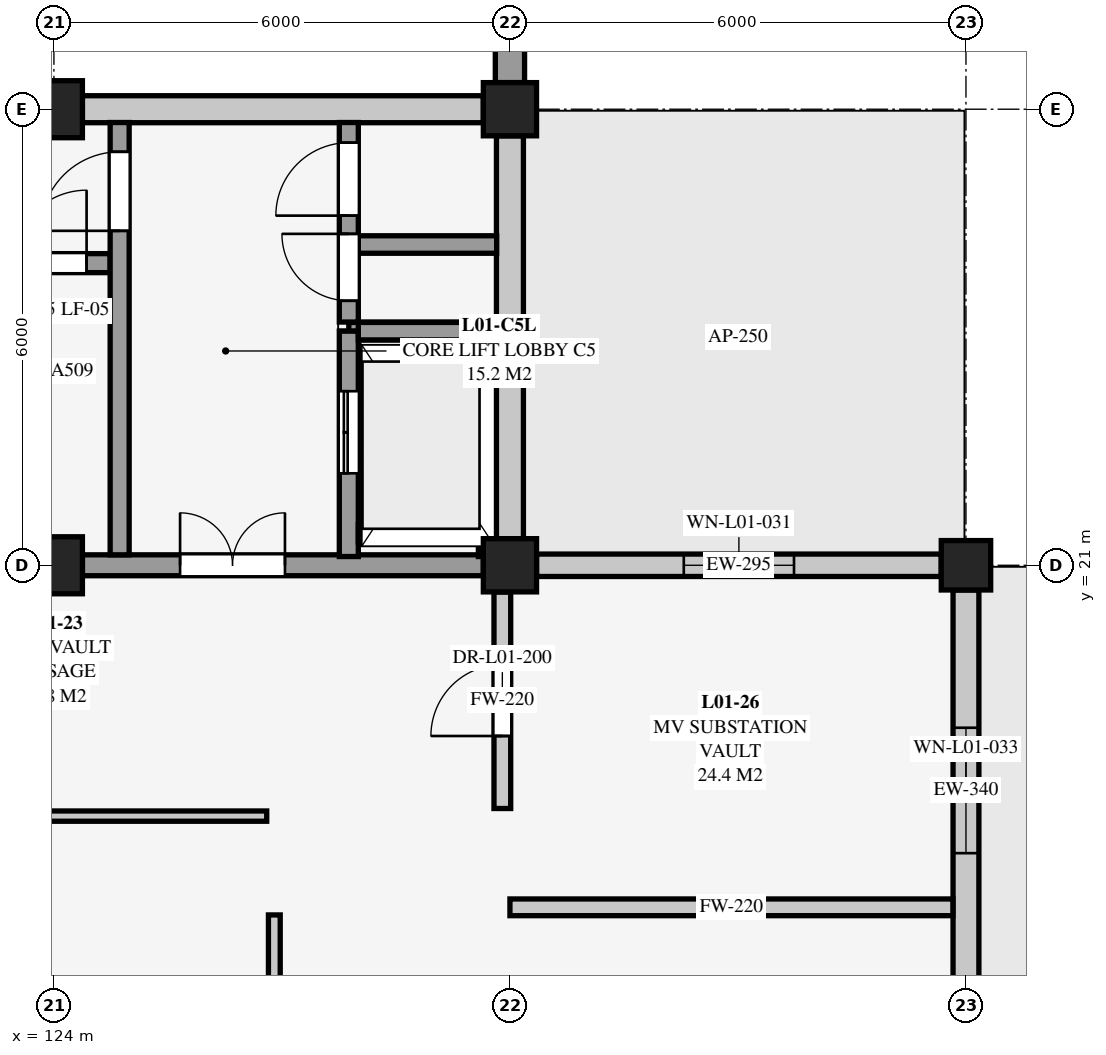
"""IFC4 building model, lengths in metres.
Left out: names, types, materials, properties, quantities, classifications, styles, units other than length and angle.
Written with IfcOpenShell. Run it as: python <this file> out.ifc"""

import sys

from ifc_helpers import new_model, si_unit, direction, frame, frame_2d, origin, origin_2d, place, context, subcontext, project, spatial, rectangle, extrude, element, fill, save


model = new_model("IFC4")
c1 = context("Model", 3, precision=1e-05, world=origin(), true_north=direction((0.0, 1.0)))
c2 = subcontext(c1, "Body", "Model", "MODEL_VIEW")
j1 = project(units=[si_unit("LENGTHUNIT", "METRE"), si_unit("PLANEANGLEUNIT", "RADIAN")], contexts=[c1])
p1 = place(None, origin())
s1 = spatial("IfcSite", under=j1, at=p1, CompositionType="ELEMENT")
p2 = place(p1, origin())
s2 = spatial("IfcBuilding", under=s1, at=p2, CompositionType="ELEMENT")
p3 = place(p2, origin())
s3 = spatial("IfcBuildingStorey", under=s2, at=p3, CompositionType="ELEMENT", Elevation=0.0)
for number, where, z_axis, x_axis in (
    (1, (124.0, 21.0, 0.0), (0.0, 0.0, 1.0), (1.0, 0.0, 0.0)),
    (2, (124.0, 27.0, 0.0), (0.0, 0.0, 1.0), (1.0, 0.0, 0.0)),
):
    element("IfcColumn", number, at=place(p3, frame(where, z_axis=z_axis, x_axis=x_axis)), inside=s3, PredefinedType="COLUMN", context=c2, shape_type="SweptSolid", body=[
        extrude(rectangle(XDim=0.75, YDim=0.75, at=origin_2d()), origin(), (0.0, 0.0, 1.0), 4.5),
    ])
for number, where, z_axis, x_axis in (
    (3, (130.0, 21.0, 0.0), (0.0, 0.0, 1.0), (1.0, 0.0, 0.0)),
    (4, (130.0, 27.0, 0.0), (0.0, 0.0, 1.0), (1.0, 0.0, 0.0)),
):
    element("IfcColumn", number, at=place(p3, frame(where, z_axis=z_axis, x_axis=x_axis)), inside=s3, PredefinedType="COLUMN", context=c2, shape_type="SweptSolid", body=[
        extrude(rectangle(XDim=0.7, YDim=0.7, at=origin_2d()), origin(), (0.0, 0.0, 1.0), 4.5),
    ])
p4 = place(p3, frame((136.0, 21.0, 0.0), z_axis=(0.0, 0.0, 1.0), x_axis=(1.0, 0.0, 0.0)))
e5 = element("IfcColumn", 5, at=p4, inside=s3, PredefinedType="COLUMN", context=c2, shape_type="SweptSolid", body=[
    extrude(rectangle(XDim=0.65, YDim=0.65, at=origin_2d()), origin(), (0.0, 0.0, 1.0), 4.5),
])
p5 = place(p3, frame((130.0, 27.35, 0.0), z_axis=(0.0, 0.0, 1.0), x_axis=(0.0, 1.0, 0.0)))
e6 = element("IfcWall", 6, at=p5, inside=s3, PredefinedType="USERDEFINED", context=c2, shape_type="SweptSolid", body=[
    extrude(rectangle(XDim=5.3, YDim=0.385, at=frame_2d((2.65, 0.0))), origin(), (0.0, 0.0, 1.0), 4.5),
])
p6 = place(p3, frame((130.35, 21.0, 0.0), z_axis=(0.0, 0.0, 1.0), x_axis=(1.0, 0.0, 0.0)))
e7 = element("IfcWall", 7, at=p6, inside=s3, PredefinedType="SOLIDWALL", context=c2, shape_type="SweptSolid", body=[
    extrude(rectangle(XDim=5.325, YDim=0.295, at=frame_2d((2.663, 0.0))), origin(), (0.0, 0.0, 1.0), 3.809),
])
p7 = place(p6, frame((1.938, 0.0, 0.75)))
e8 = element("IfcOpeningElement", 8, at=p7, cuts=e7, PredefinedType="OPENING", context=c2, shape_type="SweptSolid", body=[
    extrude(rectangle(XDim=1.45, YDim=2.25, at=frame_2d((0.725, 1.125))), frame((0.0, 0.157, 0.0), z_axis=(0.0, -1.0, 0.0), x_axis=(1.0, 0.0, 0.0)), (0.0, 0.0, 1.0), 0.315),
])
p8 = place(p3, frame((136.0, 20.675, 0.0), z_axis=(0.0, 0.0, 1.0), x_axis=(0.0, -1.0, 0.0)))
e9 = element("IfcWall", 9, at=p8, inside=s3, PredefinedType="SOLIDWALL", context=c2, shape_type="SweptSolid", body=[
    extrude(rectangle(XDim=5.275, YDim=0.34, at=frame_2d((2.638, 0.0))), origin(), (0.0, 0.0, 1.0), 3.821),
])
p9 = place(p8, frame((1.812, 0.0, 0.75)))
e10 = element("IfcOpeningElement", 10, at=p9, cuts=e9, PredefinedType="OPENING", context=c2, shape_type="SweptSolid", body=[
    extrude(rectangle(XDim=1.65, YDim=2.3, at=frame_2d((0.825, 1.15))), frame((0.0, 0.18, 0.0), z_axis=(0.0, -1.0, 0.0), x_axis=(1.0, 0.0, 0.0)), (0.0, 0.0, 1.0), 0.36),
])
p10 = place(p3, frame((124.375, 27.0, 0.0), z_axis=(0.0, 0.0, 1.0), x_axis=(1.0, 0.0, 0.0)))
e11 = element("IfcWall", 11, at=p10, inside=s3, PredefinedType="SOLIDWALL", context=c2, shape_type="SweptSolid", body=[
    extrude(rectangle(XDim=5.275, YDim=0.355, at=frame_2d((2.637, 0.0))), origin(), (0.0, 0.0, 1.0), 3.756),
])
p11 = place(p3, frame((130.0, 26.65, 0.0), z_axis=(0.0, 0.0, 1.0), x_axis=(0.0, -1.0, 0.0)))
e12 = element("IfcWall", 12, at=p11, inside=s3, PredefinedType="SOLIDWALL", context=c2, shape_type="SweptSolid", body=[
    extrude(rectangle(XDim=5.3, YDim=0.355, at=frame_2d((2.65, 0.0))), origin(), (0.0, 0.0, 1.0), 3.703),
])
p12 = place(p3, frame((127.88, 21.42, -1.05), z_axis=(0.0, 0.0, 1.0), x_axis=(1.0, 0.0, 0.0)))
e13 = element("IfcWall", 13, at=p12, inside=s3, PredefinedType="SHEAR", context=c2, shape_type="SweptSolid", body=[
    extrude(rectangle(XDim=1.82, YDim=0.23, at=frame_2d((0.91, 0.0))), origin(), (0.0, 0.0, 1.0), 1.05),
])
p13 = place(p3, frame((129.7, 21.42, -1.05), z_axis=(0.0, 0.0, 1.0), x_axis=(0.0, 1.0, 0.0)))
e14 = element("IfcWall", 14, at=p13, inside=s3, PredefinedType="SHEAR", context=c2, shape_type="SweptSolid", body=[
    extrude(rectangle(XDim=2.66, YDim=0.23, at=frame_2d((1.33, 0.0))), origin(), (0.0, 0.0, 1.0), 1.05),
])
p14 = place(p3, frame((129.7, 24.08, -1.05), z_axis=(0.0, 0.0, 1.0), x_axis=(-1.0, 0.0, 0.0)))
e15 = element("IfcWall", 15, at=p14, inside=s3, PredefinedType="SHEAR", context=c2, shape_type="SweptSolid", body=[
    extrude(rectangle(XDim=1.82, YDim=0.23, at=frame_2d((0.91, 0.0))), origin(), (0.0, 0.0, 1.0), 1.05),
])
p15 = place(p3, frame((127.88, 24.08, -1.05), z_axis=(0.0, 0.0, 1.0), x_axis=(0.0, -1.0, 0.0)))
e16 = element("IfcWall", 16, at=p15, inside=s3, PredefinedType="SHEAR", context=c2, shape_type="SweptSolid", body=[
    extrude(rectangle(XDim=2.66, YDim=0.23, at=frame_2d((1.33, 0.0))), origin(), (0.0, 0.0, 1.0), 1.05),
])
p16 = place(p3, frame((124.375, 21.0, 0.0), z_axis=(0.0, 0.0, 1.0), x_axis=(1.0, 0.0, 0.0)))
e17 = element("IfcWall", 17, at=p16, inside=s3, PredefinedType="SHEAR", context=c2, shape_type="SweptSolid", body=[
    extrude(rectangle(XDim=5.275, YDim=0.275, at=frame_2d((2.637, 0.0))), origin(), (0.0, 0.0, 1.0), 4.216),
])
p17 = place(p16, frame((1.285, 0.0, 0.0)))
e18 = element("IfcOpeningElement", 18, at=p17, cuts=e17, PredefinedType="OPENING", context=c2, shape_type="SweptSolid", body=[
    extrude(rectangle(XDim=1.38, YDim=2.16, at=frame_2d((0.69, 1.08))), frame((0.0, 0.147, 0.0), z_axis=(0.0, -1.0, 0.0), x_axis=(1.0, 0.0, 0.0)), (0.0, 0.0, 1.0), 0.295),
])
p18 = place(p3, frame((123.16, 24.975, 0.0), z_axis=(0.0, 0.0, 1.0), x_axis=(1.0, 0.0, 0.0)))
e19 = element("IfcWall", 19, at=p18, inside=s3, PredefinedType="SHEAR", context=c2, shape_type="SweptSolid", body=[
    extrude(rectangle(XDim=1.58, YDim=0.25, at=frame_2d((0.79, 0.0))), origin(), (0.0, 0.0, 1.0), 4.216),
])
p19 = place(p18, frame((0.31, 0.0, 0.0)))
e20 = element("IfcOpeningElement", 20, at=p19, cuts=e19, PredefinedType="OPENING", context=c2, shape_type="SweptSolid", body=[
    extrude(rectangle(XDim=0.96, YDim=2.12, at=frame_2d((0.48, 1.06))), frame((0.0, 0.135, 0.0), z_axis=(0.0, -1.0, 0.0), x_axis=(1.0, 0.0, 0.0)), (0.0, 0.0, 1.0), 0.27),
])
p20 = place(p3, frame((124.865, 21.137, 0.0), z_axis=(0.0, 0.0, 1.0), x_axis=(0.0, 1.0, 0.0)))
e21 = element("IfcWall", 21, at=p20, inside=s3, PredefinedType="SHEAR", context=c2, shape_type="SweptSolid", body=[
    extrude(rectangle(XDim=5.688, YDim=0.25, at=frame_2d((2.844, 0.0))), origin(), (0.0, 0.0, 1.0), 4.216),
])
p21 = place(p20, frame((4.262, 0.0, 0.0)))
e22 = element("IfcOpeningElement", 22, at=p21, cuts=e21, PredefinedType="OPENING", context=c2, shape_type="SweptSolid", body=[
    extrude(rectangle(XDim=1.04, YDim=2.14, at=frame_2d((0.52, 1.07))), frame((0.0, 0.135, 0.0), z_axis=(0.0, -1.0, 0.0), x_axis=(1.0, 0.0, 0.0)), (0.0, 0.0, 1.0), 0.27),
])
p22 = place(p3, frame((127.88, 21.115, 0.0), z_axis=(0.0, 0.0, 1.0), x_axis=(0.0, 1.0, 0.0)))
e23 = element("IfcWall", 23, at=p22, inside=s3, PredefinedType="SHEAR", context=c2, shape_type="SweptSolid", body=[
    extrude(rectangle(XDim=2.965, YDim=0.25, at=frame_2d((1.482, 0.0))), origin(), (0.0, 0.0, 1.0), 4.5),
])
p23 = place(p22, frame((1.095, 0.0, 0.0)))
e24 = element("IfcOpeningElement", 24, at=p23, cuts=e23, PredefinedType="OPENING", context=c2, shape_type="SweptSolid", body=[
    extrude(rectangle(XDim=1.08, YDim=2.15, at=frame_2d((0.54, 1.075))), frame((0.0, 0.135, 0.0), z_axis=(0.0, -1.0, 0.0), x_axis=(1.0, 0.0, 0.0)), (0.0, 0.0, 1.0), 0.27),
])
p24 = place(p3, frame((128.005, 21.42, 0.0), z_axis=(0.0, 0.0, 1.0), x_axis=(1.0, 0.0, 0.0)))
e25 = element("IfcWall", 25, at=p24, inside=s3, PredefinedType="SHEAR", context=c2, shape_type="SweptSolid", body=[
    extrude(rectangle(XDim=1.58, YDim=0.23, at=frame_2d((0.79, 0.0))), origin(), (0.0, 0.0, 1.0), 4.5),
])
p25 = place(p3, frame((129.7, 21.115, 0.0), z_axis=(0.0, 0.0, 1.0), x_axis=(0.0, 1.0, 0.0)))
e26 = element("IfcWall", 26, at=p25, inside=s3, PredefinedType="SHEAR", context=c2, shape_type="SweptSolid", body=[
    extrude(rectangle(XDim=2.965, YDim=0.23, at=frame_2d((1.482, 0.0))), origin(), (0.0, 0.0, 1.0), 4.5),
])
p26 = place(p3, frame((128.005, 24.08, 0.0), z_axis=(0.0, 0.0, 1.0), x_axis=(1.0, 0.0, 0.0)))
e27 = element("IfcWall", 27, at=p26, inside=s3, PredefinedType="SHEAR", context=c2, shape_type="SweptSolid", body=[
    extrude(rectangle(XDim=1.58, YDim=0.23, at=frame_2d((0.79, 0.0))), origin(), (0.0, 0.0, 1.0), 4.5),
])
p27 = place(p3, frame((127.88, 24.2, 0.0), z_axis=(0.0, 0.0, 1.0), x_axis=(0.0, 1.0, 0.0)))
e28 = element("IfcWall", 28, at=p27, inside=s3, PredefinedType="SHEAR", context=c2, shape_type="SweptSolid", body=[
    extrude(rectangle(XDim=2.625, YDim=0.25, at=frame_2d((1.312, 0.0))), origin(), (0.0, 0.0, 1.0), 4.216),
])
p28 = place(p27, frame((0.28, 0.0, 0.0)))
e29 = element("IfcOpeningElement", 29, at=p28, cuts=e28, PredefinedType="OPENING", context=c2, shape_type="SweptSolid", body=[
    extrude(rectangle(XDim=0.88, YDim=2.08, at=frame_2d((0.44, 1.04))), frame((0.0, 0.135, 0.0), z_axis=(0.0, -1.0, 0.0), x_axis=(1.0, 0.0, 0.0)), (0.0, 0.0, 1.0), 0.27),
])
p29 = place(p27, frame((1.4, 0.0, 0.0)))
e30 = element("IfcOpeningElement", 30, at=p29, cuts=e28, PredefinedType="OPENING", context=c2, shape_type="SweptSolid", body=[
    extrude(rectangle(XDim=0.96, YDim=2.12, at=frame_2d((0.48, 1.06))), frame((0.0, 0.135, 0.0), z_axis=(0.0, -1.0, 0.0), x_axis=(1.0, 0.0, 0.0)), (0.0, 0.0, 1.0), 0.27),
])
p30 = place(p3, frame((128.005, 25.22, 0.0), z_axis=(0.0, 0.0, 1.0), x_axis=(1.0, 0.0, 0.0)))
e31 = element("IfcWall", 31, at=p30, inside=s3, PredefinedType="SHEAR", context=c2, shape_type="SweptSolid", body=[
    extrude(rectangle(XDim=1.82, YDim=0.23, at=frame_2d((0.91, 0.0))), origin(), (0.0, 0.0, 1.0), 4.216),
])
p31 = place(p3, frame((118.165, 17.7, 0.0), z_axis=(0.0, 0.0, 1.0), x_axis=(1.0, 0.0, 0.0)))
e32 = element("IfcWall", 32, at=p31, inside=s3, PredefinedType="PARTITIONING", context=c2, shape_type="SweptSolid", body=[
    extrude(rectangle(XDim=8.635, YDim=0.135, at=frame_2d((4.318, 0.0))), origin(), (0.0, 0.0, 1.0), 4.228),
])
p32 = place(p31, frame((3.428, 0.0, 0.0)))
e33 = element("IfcOpeningElement", 33, at=p32, cuts=e32, PredefinedType="OPENING", context=c2, shape_type="SweptSolid", body=[
    extrude(rectangle(XDim=1.78, YDim=2.3, at=frame_2d((0.89, 1.15))), frame((0.0, 0.077, 0.0), z_axis=(0.0, -1.0, 0.0), x_axis=(1.0, 0.0, 0.0)), (0.0, 0.0, 1.0), 0.155),
])
p33 = place(p3, frame((129.9, 17.8, 0.0), z_axis=(0.0, 0.0, 1.0), x_axis=(0.0, 1.0, 0.0)))
e34 = element("IfcWall", 34, at=p33, inside=s3, PredefinedType="SOLIDWALL", context=c2, shape_type="SweptSolid", body=[
    extrude(rectangle(XDim=2.848, YDim=0.22, at=frame_2d((1.424, 0.0))), origin(), (0.0, 0.0, 1.0), 3.608),
])
p34 = place(p33, frame((0.954, 0.0, 0.0)))
e35 = element("IfcOpeningElement", 35, at=p34, cuts=e34, PredefinedType="OPENING", context=c2, shape_type="SweptSolid", body=[
    extrude(rectangle(XDim=0.94, YDim=2.1, at=frame_2d((0.47, 1.05))), frame((0.0, 0.12, 0.0), z_axis=(0.0, -1.0, 0.0), x_axis=(1.0, 0.0, 0.0)), (0.0, 0.0, 1.0), 0.24),
])
p35 = place(p3, frame((126.9, 9.635, 0.0), z_axis=(0.0, 0.0, 1.0), x_axis=(0.0, 1.0, 0.0)))
e36 = element("IfcWall", 36, at=p35, inside=s3, PredefinedType="PARTITIONING", context=c2, shape_type="SweptSolid", body=[
    extrude(rectangle(XDim=6.765, YDim=0.155, at=frame_2d((3.383, 0.0))), origin(), (0.0, 0.0, 1.0), 4.228),
])
p36 = place(p35, frame((2.913, 0.0, 0.0)))
e37 = element("IfcOpeningElement", 37, at=p36, cuts=e36, PredefinedType="OPENING", context=c2, shape_type="SweptSolid", body=[
    extrude(rectangle(XDim=0.94, YDim=2.1, at=frame_2d((0.47, 1.05))), frame((0.0, 0.088, 0.0), z_axis=(0.0, -1.0, 0.0), x_axis=(1.0, 0.0, 0.0)), (0.0, 0.0, 1.0), 0.175),
])
p37 = place(p3, frame((130.0, 16.5, 0.0), z_axis=(0.0, 0.0, 1.0), x_axis=(1.0, 0.0, 0.0)))
e38 = element("IfcWall", 38, at=p37, inside=s3, PredefinedType="SOLIDWALL", context=c2, shape_type="SweptSolid", body=[
    extrude(rectangle(XDim=5.828, YDim=0.22, at=frame_2d((2.914, 0.0))), origin(), (0.0, 0.0, 1.0), 4.228),
])
p38 = place(p7, origin())
e39 = element("IfcWindow", 39, at=p38, inside=s3, PartitioningType="SINGLE_PANEL", PredefinedType="WINDOW", context=c2, shape_type="SweptSolid", body=[
    extrude(rectangle(XDim=1.45, YDim=2.25, at=frame_2d((0.725, 1.125))), frame((0.0, 0.03, 0.0), z_axis=(0.0, -1.0, 0.0), x_axis=(1.0, 0.0, 0.0)), (0.0, 0.0, 1.0), 0.06),
])
fill(e8, e39)
p39 = place(p9, origin())
e40 = element("IfcWindow", 40, at=p39, inside=s3, PartitioningType="SINGLE_PANEL", PredefinedType="WINDOW", context=c2, shape_type="SweptSolid", body=[
    extrude(rectangle(XDim=1.65, YDim=2.3, at=frame_2d((0.825, 1.15))), frame((0.0, 0.03, 0.0), z_axis=(0.0, -1.0, 0.0), x_axis=(1.0, 0.0, 0.0)), (0.0, 0.0, 1.0), 0.06),
])
fill(e10, e40)
p40 = place(p17, origin())
e41 = element("IfcDoor", 41, at=p40, inside=s3, OperationType="DOUBLE_DOOR_SINGLE_SWING", PredefinedType="DOOR", context=c2, shape_type="SweptSolid", body=[
    extrude(rectangle(XDim=1.38, YDim=2.16, at=frame_2d((0.69, 1.08))), frame((0.0, 0.025, 0.0), z_axis=(0.0, -1.0, 0.0), x_axis=(1.0, 0.0, 0.0)), (0.0, 0.0, 1.0), 0.05),
])
fill(e18, e41)
p41 = place(p19, origin())
e42 = element("IfcDoor", 42, at=p41, inside=s3, OperationType="SINGLE_SWING_RIGHT", PredefinedType="DOOR", context=c2, shape_type="SweptSolid", body=[
    extrude(rectangle(XDim=0.96, YDim=2.12, at=frame_2d((0.48, 1.06))), frame((0.0, 0.025, 0.0), z_axis=(0.0, -1.0, 0.0), x_axis=(1.0, 0.0, 0.0)), (0.0, 0.0, 1.0), 0.05),
])
fill(e20, e42)
p42 = place(p21, origin())
e43 = element("IfcDoor", 43, at=p42, inside=s3, OperationType="SINGLE_SWING_LEFT", PredefinedType="DOOR", context=c2, shape_type="SweptSolid", body=[
    extrude(rectangle(XDim=1.04, YDim=2.14, at=frame_2d((0.52, 1.07))), frame((0.0, 0.025, 0.0), z_axis=(0.0, -1.0, 0.0), x_axis=(1.0, 0.0, 0.0)), (0.0, 0.0, 1.0), 0.05),
])
fill(e22, e43)
p43 = place(p23, origin())
e44 = element("IfcDoor", 44, at=p43, inside=s3, OperationType="DOUBLE_DOOR_SLIDING", PredefinedType="DOOR", context=c2, shape_type="SweptSolid", body=[
    extrude(rectangle(XDim=1.08, YDim=2.15, at=frame_2d((0.54, 1.075))), frame((0.0, 0.025, 0.0), z_axis=(0.0, -1.0, 0.0), x_axis=(1.0, 0.0, 0.0)), (0.0, 0.0, 1.0), 0.05),
])
fill(e24, e44)
p44 = place(p28, origin())
e45 = element("IfcDoor", 45, at=p44, inside=s3, OperationType="SINGLE_SWING_RIGHT", PredefinedType="DOOR", context=c2, shape_type="SweptSolid", body=[
    extrude(rectangle(XDim=0.88, YDim=2.08, at=frame_2d((0.44, 1.04))), frame((0.0, 0.025, 0.0), z_axis=(0.0, -1.0, 0.0), x_axis=(1.0, 0.0, 0.0)), (0.0, 0.0, 1.0), 0.05),
])
fill(e29, e45)
p45 = place(p29, origin())
e46 = element("IfcDoor", 46, at=p45, inside=s3, OperationType="SINGLE_SWING_LEFT", PredefinedType="DOOR", context=c2, shape_type="SweptSolid", body=[
    extrude(rectangle(XDim=0.96, YDim=2.12, at=frame_2d((0.48, 1.06))), frame((0.0, 0.025, 0.0), z_axis=(0.0, -1.0, 0.0), x_axis=(1.0, 0.0, 0.0)), (0.0, 0.0, 1.0), 0.05),
])
fill(e30, e46)
p46 = place(p34, origin())
e47 = element("IfcDoor", 47, at=p46, inside=s3, OperationType="SINGLE_SWING_LEFT", PredefinedType="DOOR", context=c2, shape_type="SweptSolid", body=[
    extrude(rectangle(XDim=0.94, YDim=2.1, at=frame_2d((0.47, 1.05))), frame((0.0, 0.025, 0.0), z_axis=(0.0, -1.0, 0.0), x_axis=(1.0, 0.0, 0.0)), (0.0, 0.0, 1.0), 0.05),
])
fill(e35, e47)
save(model, sys.argv[1])
